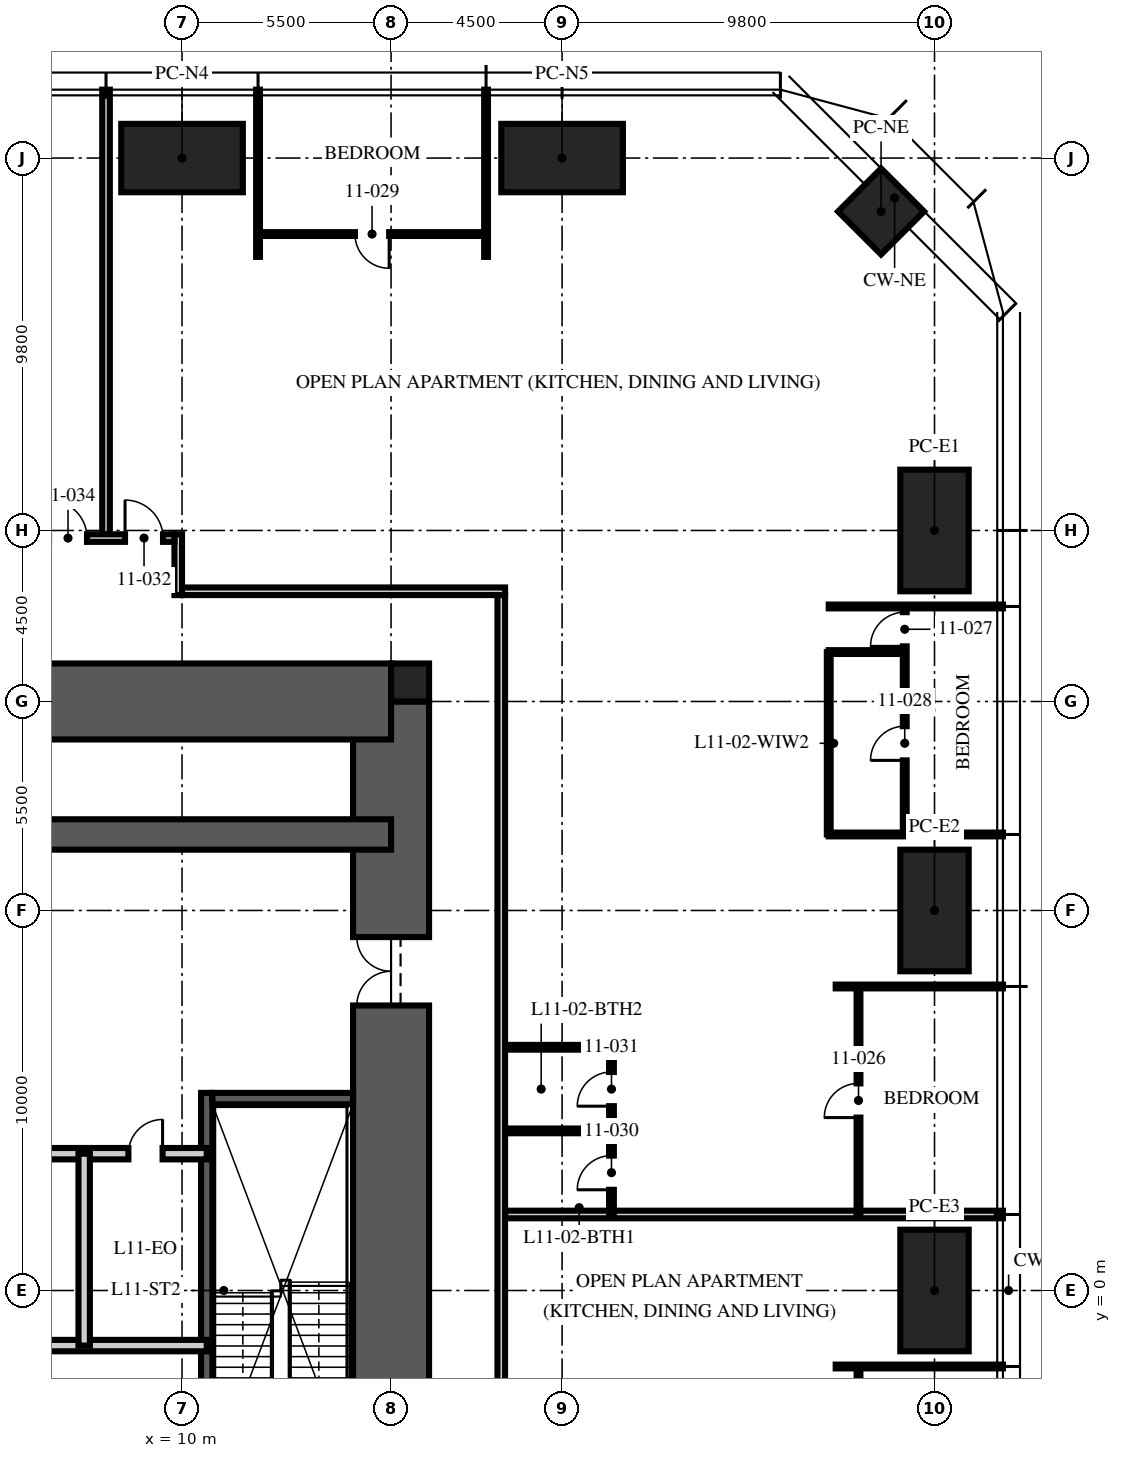
"""IFC4 building model, lengths in metres.
Left out: names, types, materials, properties, quantities, classifications, styles, units other than length and angle.
Written with IfcOpenShell. Run it as: python <this file> out.ifc"""

import sys

from ifc_helpers import new_model, si_unit, direction, frame, frame_2d, origin, origin_2d, place, context, subcontext, project, spatial, rectangle, hollow_rectangle, extrude, element, fill, save


model = new_model("IFC4")
c1 = context("Model", 3, precision=1e-05, world=origin(), true_north=direction((0.0, 1.0)))
c2 = subcontext(c1, "Body", "Model", "MODEL_VIEW")
j1 = project(units=[si_unit("LENGTHUNIT", "METRE"), si_unit("PLANEANGLEUNIT", "RADIAN")], contexts=[c1])
p1 = place(None, origin())
s1 = spatial("IfcSite", under=j1, at=p1, CompositionType="ELEMENT")
p2 = place(p1, origin())
s2 = spatial("IfcBuilding", under=s1, at=p2, CompositionType="ELEMENT")
p3 = place(p2, frame((0.0, 0.0, 47.25)))
s3 = spatial("IfcBuildingStorey", under=s2, at=p3, CompositionType="ELEMENT", Elevation=47.25)
p4 = place(p3, frame((15.5, -15.5, -0.25), z_axis=(0.0, 0.0, 1.0), x_axis=(0.0, 1.0, 0.0)))
e1 = element("IfcWall", 1, at=p4, inside=s3, PredefinedType="SHEAR", context=c2, shape_type="SweptSolid", body=[
    extrude(rectangle(XDim=31.0, YDim=2.0, at=frame_2d((15.5, 0.0))), origin(), (0.0, 0.0, 1.0), 3.75),
])
p5 = place(p4, frame((6.5, 0.0, 0.25)))
e2 = element("IfcOpeningElement", 2, at=p5, cuts=e1, PredefinedType="OPENING", context=c2, shape_type="SweptSolid", body=[
    extrude(rectangle(XDim=1.2, YDim=2.1, at=frame_2d((0.6, 1.05))), frame((0.0, 1.01, 0.0), z_axis=(0.0, -1.0, 0.0), x_axis=(1.0, 0.0, 0.0)), (0.0, 0.0, 1.0), 2.02),
])
p6 = place(p4, frame((23.0, 0.0, 0.25)))
e3 = element("IfcOpeningElement", 3, at=p6, cuts=e1, PredefinedType="OPENING", context=c2, shape_type="SweptSolid", body=[
    extrude(rectangle(XDim=1.8, YDim=2.1, at=frame_2d((0.9, 1.05))), frame((0.0, 1.01, 0.0), z_axis=(0.0, -1.0, 0.0), x_axis=(1.0, 0.0, 0.0)), (0.0, 0.0, 1.0), 2.02),
])
p7 = place(p3, frame((-15.5, 15.5, -0.25), z_axis=(0.0, 0.0, 1.0), x_axis=(1.0, 0.0, 0.0)))
e4 = element("IfcWall", 4, at=p7, inside=s3, PredefinedType="SHEAR", context=c2, shape_type="SweptSolid", body=[
    extrude(rectangle(XDim=31.0, YDim=2.0, at=frame_2d((15.5, 0.0))), origin(), (0.0, 0.0, 1.0), 3.75),
])
p8 = place(p7, frame((10.4, 0.0, 0.25)))
e5 = element("IfcOpeningElement", 5, at=p8, cuts=e4, PredefinedType="OPENING", context=c2, shape_type="SweptSolid", body=[
    extrude(rectangle(XDim=1.1, YDim=2.1, at=frame_2d((0.55, 1.05))), frame((0.0, 1.01, 0.0), z_axis=(0.0, -1.0, 0.0), x_axis=(1.0, 0.0, 0.0)), (0.0, 0.0, 1.0), 2.02),
])
p9 = place(p7, frame((13.5, 0.0, 0.25)))
e6 = element("IfcOpeningElement", 6, at=p9, cuts=e4, PredefinedType="OPENING", context=c2, shape_type="SweptSolid", body=[
    extrude(rectangle(XDim=1.1, YDim=2.1, at=frame_2d((0.55, 1.05))), frame((0.0, 1.01, 0.0), z_axis=(0.0, -1.0, 0.0), x_axis=(1.0, 0.0, 0.0)), (0.0, 0.0, 1.0), 2.02),
])
p10 = place(p7, frame((16.6, 0.0, 0.25)))
e7 = element("IfcOpeningElement", 7, at=p10, cuts=e4, PredefinedType="OPENING", context=c2, shape_type="SweptSolid", body=[
    extrude(rectangle(XDim=1.1, YDim=2.1, at=frame_2d((0.55, 1.05))), frame((0.0, 1.01, 0.0), z_axis=(0.0, -1.0, 0.0), x_axis=(1.0, 0.0, 0.0)), (0.0, 0.0, 1.0), 2.02),
])
p11 = place(p3, frame((-15.5, 12.0, -0.25), z_axis=(0.0, 0.0, 1.0), x_axis=(1.0, 0.0, 0.0)))
e8 = element("IfcWall", 8, at=p11, inside=s3, PredefinedType="SHEAR", context=c2, shape_type="SweptSolid", body=[
    extrude(rectangle(XDim=31.0, YDim=0.8, at=frame_2d((15.5, 0.0))), origin(), (0.0, 0.0, 1.0), 3.75),
])
p12 = place(p3, frame((16.0, 16.0, -0.25), z_axis=(0.0, 0.0, 1.0), x_axis=(1.0, 0.0, 0.0)))
e9 = element("IfcColumn", 9, at=p12, inside=s3, PredefinedType="COLUMN", context=c2, shape_type="SweptSolid", body=[
    extrude(rectangle(XDim=1.0, YDim=1.0, at=origin_2d()), origin(), (0.0, 0.0, 1.0), 3.75),
])
for number, where, z_axis, x_axis in (
    (10, (10.0, 29.8, 0.0), (0.0, 0.0, 1.0), (1.0, 0.0, 0.0)),
    (11, (20.0, 29.8, 0.0), (0.0, 0.0, 1.0), (1.0, 0.0, 0.0)),
    (12, (29.8, 20.0, 0.0), (0.0, 0.0, 1.0), (0.0, 1.0, 0.0)),
    (13, (29.8, 10.0, 0.0), (0.0, 0.0, 1.0), (0.0, 1.0, 0.0)),
    (14, (29.8, 0.0, 0.0), (0.0, 0.0, 1.0), (0.0, 1.0, 0.0)),
):
    element("IfcColumn", number, at=place(p3, frame(where, z_axis=z_axis, x_axis=x_axis)), inside=s3, PredefinedType="COLUMN", context=c2, shape_type="SweptSolid", body=[
        extrude(hollow_rectangle(XDim=3.2, YDim=1.8, WallThickness=0.2, at=origin_2d()), origin(), (0.0, 0.0, 1.0), 3.75),
    ])
p13 = place(p3, frame((28.394, 28.394, 0.0), z_axis=(0.0, 0.0, 1.0), x_axis=(0.707106781187, -0.707106781187, 0.0)))
e15 = element("IfcColumn", 15, at=p13, inside=s3, PredefinedType="COLUMN", context=c2, shape_type="SweptSolid", body=[
    extrude(hollow_rectangle(XDim=1.6, YDim=1.6, WallThickness=0.1, at=origin_2d()), origin(), (0.0, 0.0, 1.0), 3.75),
])
p14 = place(p3, frame((10.65, -4.9, 0.0), z_axis=(0.0, 0.0, 1.0), x_axis=(0.0, 1.0, 0.0)))
e16 = element("IfcWall", 16, at=p14, inside=s3, PredefinedType="SOLIDWALL", context=c2, shape_type="SweptSolid", body=[
    extrude(rectangle(XDim=10.1, YDim=0.3, at=frame_2d((5.05, 0.0))), origin(), (0.0, 0.0, 1.0), 3.5),
])
p15 = place(p3, frame((14.5, 5.05, 0.0), z_axis=(0.0, 0.0, 1.0), x_axis=(-1.0, 0.0, 0.0)))
e17 = element("IfcWall", 17, at=p15, inside=s3, PredefinedType="SOLIDWALL", context=c2, shape_type="SweptSolid", body=[
    extrude(rectangle(XDim=3.7, YDim=0.3, at=frame_2d((1.85, 0.0))), origin(), (0.0, 0.0, 1.0), 3.5),
])
p16 = place(p3, frame((-10.65, 3.6, 0.0), z_axis=(0.0, 0.0, 1.0), x_axis=(1.0, 0.0, 0.0)))
e18 = element("IfcWall", 18, at=p16, inside=s3, PredefinedType="PARTITIONING", context=c2, shape_type="SweptSolid", body=[
    extrude(rectangle(XDim=21.3, YDim=0.3, at=frame_2d((10.65, 0.0))), origin(), (0.0, 0.0, 1.0), 3.5),
])
p17 = place(p16, frame((10.05, 0.0, 0.0)))
e19 = element("IfcOpeningElement", 19, at=p17, cuts=e18, PredefinedType="OPENING", context=c2, shape_type="SweptSolid", body=[
    extrude(rectangle(XDim=1.2, YDim=2.1, at=frame_2d((0.6, 1.05))), frame((0.0, 0.16, 0.0), z_axis=(0.0, -1.0, 0.0), x_axis=(1.0, 0.0, 0.0)), (0.0, 0.0, 1.0), 0.32),
])
p18 = place(p16, frame((19.238, 0.0, 0.0)))
e20 = element("IfcOpeningElement", 20, at=p18, cuts=e18, PredefinedType="OPENING", context=c2, shape_type="SweptSolid", body=[
    extrude(rectangle(XDim=0.9, YDim=2.1, at=frame_2d((0.45, 1.05))), frame((0.0, 0.16, 0.0), z_axis=(0.0, -1.0, 0.0), x_axis=(1.0, 0.0, 0.0)), (0.0, 0.0, 1.0), 0.32),
])
p19 = place(p3, frame((10.65, -1.45, 0.0), z_axis=(0.0, 0.0, 1.0), x_axis=(-1.0, 0.0, 0.0)))
e21 = element("IfcWall", 21, at=p19, inside=s3, PredefinedType="PARTITIONING", context=c2, shape_type="SweptSolid", body=[
    extrude(rectangle(XDim=6.45, YDim=0.3, at=frame_2d((3.225, 0.0))), origin(), (0.0, 0.0, 1.0), 3.5),
])
p20 = place(p3, frame((7.425, -1.45, 0.0), z_axis=(0.0, 0.0, 1.0), x_axis=(0.0, 1.0, 0.0)))
e22 = element("IfcWall", 22, at=p20, inside=s3, PredefinedType="PARTITIONING", context=c2, shape_type="SweptSolid", body=[
    extrude(rectangle(XDim=5.05, YDim=0.3, at=frame_2d((2.525, 0.0))), origin(), (0.0, 0.0, 1.0), 3.5),
])
p21 = place(p3, frame((27.2, -2.0, 0.0), z_axis=(0.0, 0.0, 1.0), x_axis=(1.0, 0.0, 0.0)))
e23 = element("IfcWall", 23, at=p21, inside=s3, PredefinedType="PARTITIONING", context=c2, shape_type="SweptSolid", body=[
    extrude(rectangle(XDim=4.4, YDim=0.1, at=frame_2d((2.2, 0.0))), origin(), (0.0, 0.0, 1.0), 2.71),
])
p22 = place(p3, frame((18.5, 2.0, 0.0), z_axis=(0.0, 0.0, 1.0), x_axis=(1.0, 0.0, 0.0)))
e24 = element("IfcWall", 24, at=p22, inside=s3, PredefinedType="PARTITIONING", context=c2, shape_type="SweptSolid", body=[
    extrude(rectangle(XDim=13.1, YDim=0.2, at=frame_2d((6.55, 0.0))), origin(), (0.0, 0.0, 1.0), 2.71),
])
p23 = place(p3, frame((27.2, 8.0, 0.0), z_axis=(0.0, 0.0, 1.0), x_axis=(1.0, 0.0, 0.0)))
e25 = element("IfcWall", 25, at=p23, inside=s3, PredefinedType="PARTITIONING", context=c2, shape_type="SweptSolid", body=[
    extrude(rectangle(XDim=4.4, YDim=0.1, at=frame_2d((2.2, 0.0))), origin(), (0.0, 0.0, 1.0), 2.71),
])
for number, where, z_axis, x_axis in (
    (26, (27.017, 12.0, 0.0), (0.0, 0.0, 1.0), (1.0, 0.0, 0.0)),
    (27, (27.017, 18.0, 0.0), (0.0, 0.0, 1.0), (1.0, 0.0, 0.0)),
):
    element("IfcWall", number, at=place(p3, frame(where, z_axis=z_axis, x_axis=x_axis)), inside=s3, PredefinedType="PARTITIONING", context=c2, shape_type="SweptSolid", body=[
        extrude(rectangle(XDim=4.583, YDim=0.1, at=frame_2d((2.292, 0.0))), origin(), (0.0, 0.0, 1.0), 2.71),
    ])
for number, where, z_axis, x_axis in (
    (28, (18.0, 27.2, 0.0), (0.0, 0.0, 1.0), (0.0, 1.0, 0.0)),
    (29, (12.0, 27.2, 0.0), (0.0, 0.0, 1.0), (0.0, 1.0, 0.0)),
):
    element("IfcWall", number, at=place(p3, frame(where, z_axis=z_axis, x_axis=x_axis)), inside=s3, PredefinedType="PARTITIONING", context=c2, shape_type="SweptSolid", body=[
        extrude(rectangle(XDim=4.4, YDim=0.1, at=frame_2d((2.2, 0.0))), origin(), (0.0, 0.0, 1.0), 2.71),
    ])
p24 = place(p3, frame((8.0, 19.9, 0.0), z_axis=(0.0, 0.0, 1.0), x_axis=(0.0, 1.0, 0.0)))
e30 = element("IfcWall", 30, at=p24, inside=s3, PredefinedType="PARTITIONING", context=c2, shape_type="SweptSolid", body=[
    extrude(rectangle(XDim=11.7, YDim=0.2, at=frame_2d((5.85, 0.0))), origin(), (0.0, 0.0, 1.0), 2.71),
])
p25 = place(p3, frame((27.8, -8.0, 0.0), z_axis=(0.0, 0.0, 1.0), x_axis=(0.0, 1.0, 0.0)))
e31 = element("IfcWall", 31, at=p25, inside=s3, PredefinedType="PARTITIONING", context=c2, shape_type="SweptSolid", body=[
    extrude(rectangle(XDim=6.0, YDim=0.1, at=frame_2d((3.0, 0.0))), origin(), (0.0, 0.0, 1.0), 2.61),
])
p26 = place(p25, frame((2.55, 0.0, 0.0)))
e32 = element("IfcOpeningElement", 32, at=p26, cuts=e31, PredefinedType="OPENING", context=c2, shape_type="SweptSolid", body=[
    extrude(rectangle(XDim=0.9, YDim=2.1, at=frame_2d((0.45, 1.05))), frame((0.0, 0.06, 0.0), z_axis=(0.0, -1.0, 0.0), x_axis=(1.0, 0.0, 0.0)), (0.0, 0.0, 1.0), 0.12),
])
p27 = place(p3, frame((27.8, 2.0, 0.0), z_axis=(0.0, 0.0, 1.0), x_axis=(0.0, 1.0, 0.0)))
e33 = element("IfcWall", 33, at=p27, inside=s3, PredefinedType="PARTITIONING", context=c2, shape_type="SweptSolid", body=[
    extrude(rectangle(XDim=6.0, YDim=0.1, at=frame_2d((3.0, 0.0))), origin(), (0.0, 0.0, 1.0), 2.61),
])
p28 = place(p27, frame((2.55, 0.0, 0.0)))
e34 = element("IfcOpeningElement", 34, at=p28, cuts=e33, PredefinedType="OPENING", context=c2, shape_type="SweptSolid", body=[
    extrude(rectangle(XDim=0.9, YDim=2.1, at=frame_2d((0.45, 1.05))), frame((0.0, 0.06, 0.0), z_axis=(0.0, -1.0, 0.0), x_axis=(1.0, 0.0, 0.0)), (0.0, 0.0, 1.0), 0.12),
])
p29 = place(p3, frame((29.017, 12.0, 0.0), z_axis=(0.0, 0.0, 1.0), x_axis=(0.0, 1.0, 0.0)))
e35 = element("IfcWall", 35, at=p29, inside=s3, PredefinedType="PARTITIONING", context=c2, shape_type="SweptSolid", body=[
    extrude(rectangle(XDim=6.0, YDim=0.1, at=frame_2d((3.0, 0.0))), origin(), (0.0, 0.0, 1.0), 2.61),
])
p30 = place(p29, frame((4.95, 0.0, 0.0)))
e36 = element("IfcOpeningElement", 36, at=p30, cuts=e35, PredefinedType="OPENING", context=c2, shape_type="SweptSolid", body=[
    extrude(rectangle(XDim=0.9, YDim=2.1, at=frame_2d((0.45, 1.05))), frame((0.0, 0.06, 0.0), z_axis=(0.0, -1.0, 0.0), x_axis=(1.0, 0.0, 0.0)), (0.0, 0.0, 1.0), 0.12),
])
p31 = place(p29, frame((1.95, 0.0, 0.0)))
e37 = element("IfcOpeningElement", 37, at=p31, cuts=e35, PredefinedType="OPENING", context=c2, shape_type="SweptSolid", body=[
    extrude(rectangle(XDim=0.9, YDim=2.1, at=frame_2d((0.45, 1.05))), frame((0.0, 0.06, 0.0), z_axis=(0.0, -1.0, 0.0), x_axis=(1.0, 0.0, 0.0)), (0.0, 0.0, 1.0), 0.12),
])
p32 = place(p3, frame((27.017, 16.8, 0.0), z_axis=(0.0, 0.0, 1.0), x_axis=(1.0, 0.0, 0.0)))
e38 = element("IfcWall", 38, at=p32, inside=s3, PredefinedType="PARTITIONING", context=c2, shape_type="SweptSolid", body=[
    extrude(rectangle(XDim=2.0, YDim=0.1, at=frame_2d((1.0, 0.0))), origin(), (0.0, 0.0, 1.0), 3.5),
])
p33 = place(p3, frame((27.017, 12.0, 0.0), z_axis=(0.0, 0.0, 1.0), x_axis=(0.0, 1.0, 0.0)))
e39 = element("IfcWall", 39, at=p33, inside=s3, PredefinedType="PARTITIONING", context=c2, shape_type="SweptSolid", body=[
    extrude(rectangle(XDim=4.8, YDim=0.1, at=frame_2d((2.4, 0.0))), origin(), (0.0, 0.0, 1.0), 2.61),
])
p34 = place(p3, frame((18.0, 27.8, 0.0), z_axis=(0.0, 0.0, 1.0), x_axis=(-1.0, 0.0, 0.0)))
e40 = element("IfcWall", 40, at=p34, inside=s3, PredefinedType="PARTITIONING", context=c2, shape_type="SweptSolid", body=[
    extrude(rectangle(XDim=6.0, YDim=0.1, at=frame_2d((3.0, 0.0))), origin(), (0.0, 0.0, 1.0), 2.61),
])
p35 = place(p34, frame((2.55, 0.0, 0.0)))
e41 = element("IfcOpeningElement", 41, at=p35, cuts=e40, PredefinedType="OPENING", context=c2, shape_type="SweptSolid", body=[
    extrude(rectangle(XDim=0.9, YDim=2.1, at=frame_2d((0.45, 1.05))), frame((0.0, 0.06, 0.0), z_axis=(0.0, -1.0, 0.0), x_axis=(1.0, 0.0, 0.0)), (0.0, 0.0, 1.0), 0.12),
])
p36 = place(p3, frame((21.3, 2.0, 0.0), z_axis=(0.0, 0.0, 1.0), x_axis=(0.0, 1.0, 0.0)))
e42 = element("IfcWall", 42, at=p36, inside=s3, PredefinedType="PARTITIONING", context=c2, shape_type="SweptSolid", body=[
    extrude(rectangle(XDim=4.4, YDim=0.125, at=frame_2d((2.2, 0.0))), origin(), (0.0, 0.0, 1.0), 2.61),
])
p37 = place(p36, frame((0.65, 0.0, 0.0)))
e43 = element("IfcOpeningElement", 43, at=p37, cuts=e42, PredefinedType="OPENING", context=c2, shape_type="SweptSolid", body=[
    extrude(rectangle(XDim=0.9, YDim=2.1, at=frame_2d((0.45, 1.05))), frame((0.0, 0.073, 0.0), z_axis=(0.0, -1.0, 0.0), x_axis=(1.0, 0.0, 0.0)), (0.0, 0.0, 1.0), 0.145),
])
p38 = place(p36, frame((2.85, 0.0, 0.0)))
e44 = element("IfcOpeningElement", 44, at=p38, cuts=e42, PredefinedType="OPENING", context=c2, shape_type="SweptSolid", body=[
    extrude(rectangle(XDim=0.9, YDim=2.1, at=frame_2d((0.45, 1.05))), frame((0.0, 0.073, 0.0), z_axis=(0.0, -1.0, 0.0), x_axis=(1.0, 0.0, 0.0)), (0.0, 0.0, 1.0), 0.145),
])
for number, where, z_axis, x_axis in (
    (45, (18.5, 4.2, 0.0), (0.0, 0.0, 1.0), (1.0, 0.0, 0.0)),
    (46, (18.5, 6.4, 0.0), (0.0, 0.0, 1.0), (1.0, 0.0, 0.0)),
):
    element("IfcWall", number, at=place(p3, frame(where, z_axis=z_axis, x_axis=x_axis)), inside=s3, PredefinedType="PARTITIONING", context=c2, shape_type="SweptSolid", body=[
        extrude(rectangle(XDim=2.8, YDim=0.125, at=frame_2d((1.4, 0.0))), origin(), (0.0, 0.0, 1.0), 3.5),
    ])
p39 = place(p3, frame((18.4, -6.0, 0.0), z_axis=(0.0, 0.0, 1.0), x_axis=(0.0, 1.0, 0.0)))
e47 = element("IfcWall", 47, at=p39, inside=s3, PredefinedType="PARTITIONING", context=c2, shape_type="SweptSolid", body=[
    extrude(rectangle(XDim=24.3, YDim=0.2, at=frame_2d((12.15, 0.0))), origin(), (0.0, 0.0, 1.0), 2.3),
])
p40 = place(p3, frame((9.9, 18.3, 0.0), z_axis=(0.0, 0.0, 1.0), x_axis=(0.0, 1.0, 0.0)))
e48 = element("IfcWall", 48, at=p40, inside=s3, PredefinedType="PARTITIONING", context=c2, shape_type="SweptSolid", body=[
    extrude(rectangle(XDim=1.6, YDim=0.2, at=frame_2d((0.8, 0.0))), origin(), (0.0, 0.0, 1.0), 2.492),
])
p41 = place(p3, frame((6.2, 19.8, 0.0), z_axis=(0.0, 0.0, 1.0), x_axis=(1.0, 0.0, 0.0)))
e49 = element("IfcWall", 49, at=p41, inside=s3, PredefinedType="PARTITIONING", context=c2, shape_type="SweptSolid", body=[
    extrude(rectangle(XDim=3.6, YDim=0.2, at=frame_2d((1.8, 0.0))), origin(), (0.0, 0.0, 1.0), 3.5),
])
p42 = place(p41, frame((2.3, 0.0, 0.0)))
e50 = element("IfcOpeningElement", 50, at=p42, cuts=e49, PredefinedType="OPENING", context=c2, shape_type="SweptSolid", body=[
    extrude(rectangle(XDim=1.0, YDim=2.2, at=frame_2d((0.5, 1.1))), frame((0.0, 0.11, 0.0), z_axis=(0.0, -1.0, 0.0), x_axis=(1.0, 0.0, 0.0)), (0.0, 0.0, 1.0), 0.22),
])
p43 = place(p41, frame((0.3, 0.0, 0.0)))
e51 = element("IfcOpeningElement", 51, at=p43, cuts=e49, PredefinedType="OPENING", context=c2, shape_type="SweptSolid", body=[
    extrude(rectangle(XDim=1.0, YDim=2.2, at=frame_2d((0.5, 1.1))), frame((0.0, 0.11, 0.0), z_axis=(0.0, -1.0, 0.0), x_axis=(1.0, 0.0, 0.0)), (0.0, 0.0, 1.0), 0.22),
])
p44 = place(p3, frame((10.0, 18.4, 0.0), z_axis=(0.0, 0.0, 1.0), x_axis=(1.0, 0.0, 0.0)))
e52 = element("IfcWall", 52, at=p44, inside=s3, PredefinedType="PARTITIONING", context=c2, shape_type="SweptSolid", body=[
    extrude(rectangle(XDim=8.5, YDim=0.2, at=frame_2d((4.25, 0.0))), origin(), (0.0, 0.0, 1.0), 2.3),
])
p45 = place(p6, origin())
e53 = element("IfcDoor", 53, at=p45, inside=s3, OperationType="DOUBLE_DOOR_SINGLE_SWING", PredefinedType="DOOR", context=c2, shape_type="SweptSolid", body=[
    extrude(rectangle(XDim=1.8, YDim=2.1, at=frame_2d((0.9, 1.05))), frame((0.0, 0.025, 0.0), z_axis=(0.0, -1.0, 0.0), x_axis=(1.0, 0.0, 0.0)), (0.0, 0.0, 1.0), 0.05),
])
fill(e3, e53)
p46 = place(p18, origin())
e54 = element("IfcDoor", 54, at=p46, inside=s3, OperationType="SINGLE_SWING_RIGHT", PredefinedType="DOOR", context=c2, shape_type="SweptSolid", body=[
    extrude(rectangle(XDim=0.9, YDim=2.1, at=frame_2d((0.45, 1.05))), frame((0.0, 0.025, 0.0), z_axis=(0.0, -1.0, 0.0), x_axis=(1.0, 0.0, 0.0)), (0.0, 0.0, 1.0), 0.05),
])
fill(e20, e54)
p47 = place(p28, origin())
e55 = element("IfcDoor", 55, at=p47, inside=s3, OperationType="SINGLE_SWING_LEFT", PredefinedType="DOOR", context=c2, shape_type="SweptSolid", body=[
    extrude(rectangle(XDim=0.9, YDim=2.1, at=frame_2d((0.45, 1.05))), frame((0.0, 0.025, 0.0), z_axis=(0.0, -1.0, 0.0), x_axis=(1.0, 0.0, 0.0)), (0.0, 0.0, 1.0), 0.05),
])
fill(e34, e55)
p48 = place(p30, origin())
e56 = element("IfcDoor", 56, at=p48, inside=s3, OperationType="SINGLE_SWING_LEFT", PredefinedType="DOOR", context=c2, shape_type="SweptSolid", body=[
    extrude(rectangle(XDim=0.9, YDim=2.1, at=frame_2d((0.45, 1.05))), frame((0.0, 0.025, 0.0), z_axis=(0.0, -1.0, 0.0), x_axis=(1.0, 0.0, 0.0)), (0.0, 0.0, 1.0), 0.05),
])
fill(e36, e56)
p49 = place(p31, origin())
e57 = element("IfcDoor", 57, at=p49, inside=s3, OperationType="SINGLE_SWING_LEFT", PredefinedType="DOOR", context=c2, shape_type="SweptSolid", body=[
    extrude(rectangle(XDim=0.9, YDim=2.1, at=frame_2d((0.45, 1.05))), frame((0.0, 0.025, 0.0), z_axis=(0.0, -1.0, 0.0), x_axis=(1.0, 0.0, 0.0)), (0.0, 0.0, 1.0), 0.05),
])
fill(e37, e57)
p50 = place(p35, origin())
e58 = element("IfcDoor", 58, at=p50, inside=s3, OperationType="SINGLE_SWING_LEFT", PredefinedType="DOOR", context=c2, shape_type="SweptSolid", body=[
    extrude(rectangle(XDim=0.9, YDim=2.1, at=frame_2d((0.45, 1.05))), frame((0.0, 0.025, 0.0), z_axis=(0.0, -1.0, 0.0), x_axis=(1.0, 0.0, 0.0)), (0.0, 0.0, 1.0), 0.05),
])
fill(e41, e58)
p51 = place(p37, origin())
e59 = element("IfcDoor", 59, at=p51, inside=s3, OperationType="SINGLE_SWING_LEFT", PredefinedType="DOOR", context=c2, shape_type="SweptSolid", body=[
    extrude(rectangle(XDim=0.9, YDim=2.1, at=frame_2d((0.45, 1.05))), frame((0.0, 0.025, 0.0), z_axis=(0.0, -1.0, 0.0), x_axis=(1.0, 0.0, 0.0)), (0.0, 0.0, 1.0), 0.05),
])
fill(e43, e59)
p52 = place(p38, origin())
e60 = element("IfcDoor", 60, at=p52, inside=s3, OperationType="SINGLE_SWING_LEFT", PredefinedType="DOOR", context=c2, shape_type="SweptSolid", body=[
    extrude(rectangle(XDim=0.9, YDim=2.1, at=frame_2d((0.45, 1.05))), frame((0.0, 0.025, 0.0), z_axis=(0.0, -1.0, 0.0), x_axis=(1.0, 0.0, 0.0)), (0.0, 0.0, 1.0), 0.05),
])
fill(e44, e60)
p53 = place(p42, origin())
e61 = element("IfcDoor", 61, at=p53, inside=s3, OperationType="SINGLE_SWING_LEFT", PredefinedType="DOOR", context=c2, shape_type="SweptSolid", body=[
    extrude(rectangle(XDim=1.0, YDim=2.2, at=frame_2d((0.5, 1.1))), frame((0.0, 0.025, 0.0), z_axis=(0.0, -1.0, 0.0), x_axis=(1.0, 0.0, 0.0)), (0.0, 0.0, 1.0), 0.05),
])
fill(e50, e61)
p54 = place(p43, origin())
e62 = element("IfcDoor", 62, at=p54, inside=s3, OperationType="SINGLE_SWING_LEFT", PredefinedType="DOOR", context=c2, shape_type="SweptSolid", body=[
    extrude(rectangle(XDim=1.0, YDim=2.2, at=frame_2d((0.5, 1.1))), frame((0.0, 0.025, 0.0), z_axis=(0.0, -1.0, 0.0), x_axis=(1.0, 0.0, 0.0)), (0.0, 0.0, 1.0), 0.05),
])
fill(e51, e62)
save(model, sys.argv[1])
